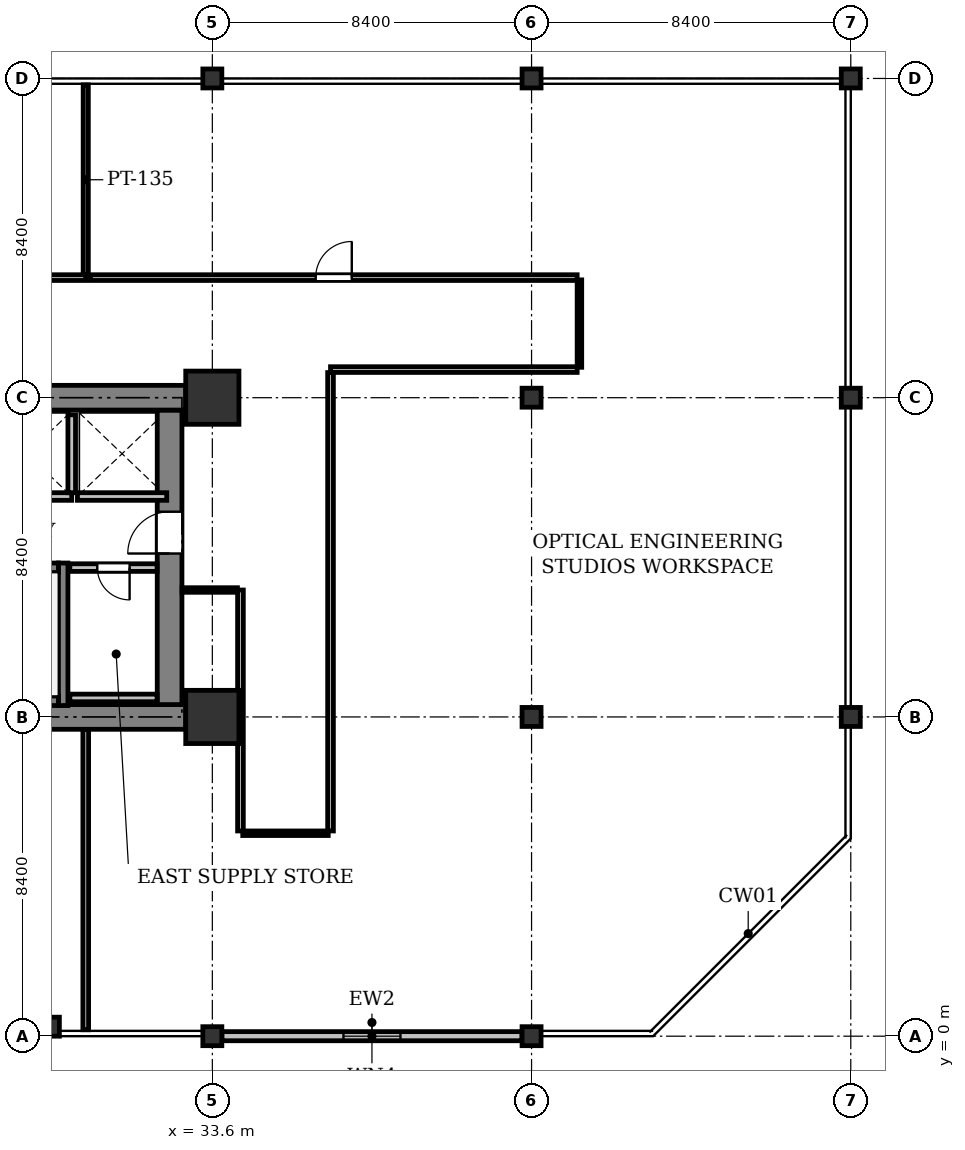
"""IFC4 building model, lengths in metres.
Left out: names, types, materials, properties, quantities, classifications, styles, units other than length and angle.
Written with IfcOpenShell. Run it as: python <this file> out.ifc"""

import sys

from ifc_helpers import new_model, si_unit, direction, frame, frame_2d, origin, origin_2d, place, context, subcontext, project, spatial, rectangle, i_section, extrude, element, fill, save


model = new_model("IFC4")
c1 = context("Model", 3, precision=1e-05, world=origin(), true_north=direction((0.0, 1.0)))
c2 = subcontext(c1, "Body", "Model", "MODEL_VIEW")
j1 = project(units=[si_unit("LENGTHUNIT", "METRE"), si_unit("PLANEANGLEUNIT", "RADIAN")], contexts=[c1])
p1 = place(None, origin())
s1 = spatial("IfcSite", under=j1, at=p1, CompositionType="ELEMENT")
p2 = place(p1, origin())
s2 = spatial("IfcBuilding", under=s1, at=p2, CompositionType="ELEMENT")
p3 = place(p2, frame((0.0, 0.0, 37.4)))
s3 = spatial("IfcBuildingStorey", under=s2, at=p3, CompositionType="ELEMENT", Elevation=37.4)
p4 = place(p3, frame((33.6, 0.0, 0.0), z_axis=(0.0, 0.0, 1.0), x_axis=(1.0, 0.0, 0.0)))
e1 = element("IfcColumn", 1, at=p4, inside=s3, PredefinedType="COLUMN", context=c2, shape_type="SweptSolid", body=[
    extrude(i_section(OverallWidth=0.5, OverallDepth=0.5, WebThickness=0.028, FlangeThickness=0.04, at=origin_2d()), origin(), (0.0, 0.0, 1.0), 4.2),
])
for number, where, z_axis, x_axis in (
    (2, (33.6, 8.4, 0.0), (0.0, 0.0, 1.0), (1.0, 0.0, 0.0)),
    (3, (33.6, 16.8, 0.0), (0.0, 0.0, 1.0), (1.0, 0.0, 0.0)),
):
    element("IfcColumn", number, at=place(p3, frame(where, z_axis=z_axis, x_axis=x_axis)), inside=s3, PredefinedType="COLUMN", context=c2, shape_type="SweptSolid", body=[
        extrude(rectangle(XDim=1.4, YDim=1.4, at=origin_2d()), origin(), (0.0, 0.0, 1.0), 4.2),
    ])
for number, where, z_axis, x_axis in (
    (4, (33.6, 25.2, 0.0), (0.0, 0.0, 1.0), (1.0, 0.0, 0.0)),
    (5, (42.0, 0.0, 0.0), (0.0, 0.0, 1.0), (1.0, 0.0, 0.0)),
    (6, (42.0, 8.4, 0.0), (0.0, 0.0, 1.0), (1.0, 0.0, 0.0)),
    (7, (42.0, 16.8, 0.0), (0.0, 0.0, 1.0), (1.0, 0.0, 0.0)),
    (8, (42.0, 25.2, 0.0), (0.0, 0.0, 1.0), (1.0, 0.0, 0.0)),
    (9, (50.4, 8.4, 0.0), (0.0, 0.0, 1.0), (1.0, 0.0, 0.0)),
    (10, (50.4, 16.8, 0.0), (0.0, 0.0, 1.0), (1.0, 0.0, 0.0)),
    (11, (50.4, 25.2, 0.0), (0.0, 0.0, 1.0), (1.0, 0.0, 0.0)),
):
    element("IfcColumn", number, at=place(p3, frame(where, z_axis=z_axis, x_axis=x_axis)), inside=s3, PredefinedType="COLUMN", context=c2, shape_type="SweptSolid", body=[
        extrude(i_section(OverallWidth=0.5, OverallDepth=0.5, WebThickness=0.028, FlangeThickness=0.04, at=origin_2d()), origin(), (0.0, 0.0, 1.0), 4.2),
    ])
p5 = place(p3, frame((29.4, 0.25, 0.0), z_axis=(0.0, 0.0, 1.0), x_axis=(1.0, 0.0, 0.0)))
e12 = element("IfcColumn", 12, at=p5, inside=s3, PredefinedType="PILASTER", context=c2, shape_type="SweptSolid", body=[
    extrude(rectangle(XDim=0.35, YDim=0.5, at=origin_2d()), origin(), (0.0, 0.0, 1.0), 4.2),
])
p6 = place(p3, frame((41.75, 0.0, 0.0), z_axis=(0.0, 0.0, 1.0), x_axis=(-1.0, 0.0, 0.0)))
e13 = element("IfcWall", 13, at=p6, inside=s3, PredefinedType="STANDARD", context=c2, shape_type="SweptSolid", body=[
    extrude(rectangle(XDim=7.9, YDim=0.24, at=frame_2d((3.95, 0.0))), origin(), (0.0, 0.0, 1.0), 3.471),
])
p7 = place(p6, frame((3.2, 0.0, 0.9)))
e14 = element("IfcOpeningElement", 14, at=p7, cuts=e13, PredefinedType="OPENING", context=c2, shape_type="SweptSolid", body=[
    extrude(rectangle(XDim=1.5, YDim=1.6, at=frame_2d((0.75, 0.8))), frame((0.0, 0.13, 0.0), z_axis=(0.0, -1.0, 0.0), x_axis=(1.0, 0.0, 0.0)), (0.0, 0.0, 1.0), 0.26),
])
p8 = place(p3, frame((25.9, 8.4, 0.0), z_axis=(0.0, 0.0, 1.0), x_axis=(1.0, 0.0, 0.0)))
e15 = element("IfcWall", 15, at=p8, inside=s3, PredefinedType="SHEAR", context=c2, shape_type="SweptSolid", body=[
    extrude(rectangle(XDim=7.0, YDim=0.65, at=frame_2d((3.5, 0.0))), origin(), (0.0, 0.0, 1.0), 3.925),
])
p9 = place(p3, frame((32.475, 8.725, 0.0), z_axis=(0.0, 0.0, 1.0), x_axis=(0.0, 1.0, 0.0)))
e16 = element("IfcWall", 16, at=p9, inside=s3, PredefinedType="SHEAR", context=c2, shape_type="SweptSolid", body=[
    extrude(rectangle(XDim=7.75, YDim=0.65, at=frame_2d((3.875, 0.0))), origin(), (0.0, 0.0, 1.0), 3.925),
])
p10 = place(p9, frame((3.975, 0.0, 0.0)))
e17 = element("IfcOpeningElement", 17, at=p10, cuts=e16, PredefinedType="OPENING", context=c2, shape_type="SweptSolid", body=[
    extrude(rectangle(XDim=1.1, YDim=2.15, at=frame_2d((0.55, 1.075))), frame((0.0, 0.335, 0.0), z_axis=(0.0, -1.0, 0.0), x_axis=(1.0, 0.0, 0.0)), (0.0, 0.0, 1.0), 0.67),
])
p11 = place(p3, frame((25.9, 16.8, 0.0), z_axis=(0.0, 0.0, 1.0), x_axis=(1.0, 0.0, 0.0)))
e18 = element("IfcWall", 18, at=p11, inside=s3, PredefinedType="SHEAR", context=c2, shape_type="SweptSolid", body=[
    extrude(rectangle(XDim=7.0, YDim=0.65, at=frame_2d((3.5, 0.0))), origin(), (0.0, 0.0, 1.0), 3.925),
])
p12 = place(p3, frame((29.675, 8.7, 0.0), z_axis=(0.0, 0.0, 1.0), x_axis=(0.0, 1.0, 0.0)))
e19 = element("IfcWall", 19, at=p12, inside=s3, PredefinedType="SHEAR", context=c2, shape_type="SweptSolid", body=[
    extrude(rectangle(XDim=3.75, YDim=0.25, at=frame_2d((1.875, 0.0))), origin(), (0.0, 0.0, 1.0), 3.925),
])
p13 = place(p3, frame((21.8, 8.825, 0.0), z_axis=(0.0, 0.0, 1.0), x_axis=(1.0, 0.0, 0.0)))
e20 = element("IfcWall", 20, at=p13, inside=s3, PredefinedType="SHEAR", context=c2, shape_type="SweptSolid", body=[
    extrude(rectangle(XDim=7.75, YDim=0.25, at=frame_2d((3.875, 0.0))), origin(), (0.0, 0.0, 1.0), 3.925),
])
p14 = place(p3, frame((21.8, 12.325, 0.0), z_axis=(0.0, 0.0, 1.0), x_axis=(1.0, 0.0, 0.0)))
e21 = element("IfcWall", 21, at=p14, inside=s3, PredefinedType="SHEAR", context=c2, shape_type="SweptSolid", body=[
    extrude(rectangle(XDim=7.75, YDim=0.25, at=frame_2d((3.875, 0.0))), origin(), (0.0, 0.0, 1.0), 3.925),
])
p15 = place(p14, frame((0.22, 0.0, 0.0)))
e22 = element("IfcOpeningElement", 22, at=p15, cuts=e21, PredefinedType="OPENING", context=c2, shape_type="SweptSolid", body=[
    extrude(rectangle(XDim=1.1, YDim=2.15, at=frame_2d((0.55, 1.075))), frame((0.0, 0.135, 0.0), z_axis=(0.0, -1.0, 0.0), x_axis=(1.0, 0.0, 0.0)), (0.0, 0.0, 1.0), 0.27),
])
p16 = place(p3, frame((27.55, 14.2, 0.0), z_axis=(0.0, 0.0, 1.0), x_axis=(1.0, 0.0, 0.0)))
e23 = element("IfcWall", 23, at=p16, inside=s3, PredefinedType="PARTITIONING", context=c2, shape_type="SweptSolid", body=[
    extrude(rectangle(XDim=2.35, YDim=0.2, at=frame_2d((1.175, 0.0))), origin(), (0.0, 0.0, 1.0), 3.925),
])
p17 = place(p3, frame((29.9, 14.3, 0.0), z_axis=(0.0, 0.0, 1.0), x_axis=(0.0, 1.0, 0.0)))
e24 = element("IfcWall", 24, at=p17, inside=s3, PredefinedType="PARTITIONING", context=c2, shape_type="SweptSolid", body=[
    extrude(rectangle(XDim=2.05, YDim=0.2, at=frame_2d((1.025, 0.0))), origin(), (0.0, 0.0, 1.0), 3.925),
])
p18 = place(p3, frame((30.05, 14.2, 0.0), z_axis=(0.0, 0.0, 1.0), x_axis=(1.0, 0.0, 0.0)))
e25 = element("IfcWall", 25, at=p18, inside=s3, PredefinedType="PARTITIONING", context=c2, shape_type="SweptSolid", body=[
    extrude(rectangle(XDim=2.35, YDim=0.2, at=frame_2d((1.175, 0.0))), origin(), (0.0, 0.0, 1.0), 3.925),
])
p19 = place(p3, frame((32.146, 12.33, 0.0), z_axis=(0.0, 0.0, 1.0), x_axis=(-1.0, 0.0, 0.0)))
e26 = element("IfcWall", 26, at=p19, inside=s3, PredefinedType="PARTITIONING", context=c2, shape_type="SweptSolid", body=[
    extrude(rectangle(XDim=2.296, YDim=0.2, at=frame_2d((1.148, 0.0))), origin(), (0.0, 0.0, 1.0), 3.925),
])
p20 = place(p19, frame((0.723, 0.0, 0.0)))
e27 = element("IfcOpeningElement", 27, at=p20, cuts=e26, PredefinedType="OPENING", context=c2, shape_type="SweptSolid", body=[
    extrude(rectangle(XDim=0.85, YDim=2.15, at=frame_2d((0.425, 1.075))), frame((0.0, 0.11, 0.0), z_axis=(0.0, -1.0, 0.0), x_axis=(1.0, 0.0, 0.0)), (0.0, 0.0, 1.0), 0.22),
])
p21 = place(p3, frame((29.85, 8.9, 0.0), z_axis=(0.0, 0.0, 1.0), x_axis=(1.0, 0.0, 0.0)))
e28 = element("IfcWall", 28, at=p21, inside=s3, PredefinedType="PARTITIONING", context=c2, shape_type="SweptSolid", body=[
    extrude(rectangle(XDim=2.296, YDim=0.2, at=frame_2d((1.148, 0.0))), origin(), (0.0, 0.0, 1.0), 3.925),
])
p22 = place(p3, frame((19.96, 19.96, 0.0), z_axis=(0.0, 0.0, 1.0), x_axis=(1.0, 0.0, 0.0)))
e29 = element("IfcWall", 29, at=p22, inside=s3, PredefinedType="PARTITIONING", context=c2, shape_type="SweptSolid", body=[
    extrude(rectangle(XDim=10.309, YDim=0.15, at=frame_2d((5.154, 0.0))), origin(), (0.0, 0.0, 1.0), 3.323),
])
p23 = place(p22, frame((4.679, 0.0, 0.0)))
e30 = element("IfcOpeningElement", 30, at=p23, cuts=e29, PredefinedType="OPENING", context=c2, shape_type="SweptSolid", body=[
    extrude(rectangle(XDim=0.95, YDim=2.15, at=frame_2d((0.475, 1.075))), frame((0.0, 0.085, 0.0), z_axis=(0.0, -1.0, 0.0), x_axis=(1.0, 0.0, 0.0)), (0.0, 0.0, 1.0), 0.17),
])
p24 = place(p3, frame((30.269, 20.039, 0.0), z_axis=(0.0, 0.0, 1.0), x_axis=(0.0, 1.0, 0.0)))
e31 = element("IfcWall", 31, at=p24, inside=s3, PredefinedType="PARTITIONING", context=c2, shape_type="SweptSolid", body=[
    extrude(rectangle(XDim=4.992, YDim=0.135, at=frame_2d((2.496, 0.0))), origin(), (0.0, 0.0, 1.0), 3.925),
])
p25 = place(p3, frame((30.269, 0.169, 0.0), z_axis=(0.0, 0.0, 1.0), x_axis=(0.0, 1.0, 0.0)))
e32 = element("IfcWall", 32, at=p25, inside=s3, PredefinedType="PARTITIONING", context=c2, shape_type="SweptSolid", body=[
    extrude(rectangle(XDim=7.902, YDim=0.15, at=frame_2d((3.951, 0.0))), origin(), (0.0, 0.0, 1.0), 3.925),
])
p26 = place(p3, frame((30.389, 19.96, 0.0), z_axis=(0.0, 0.0, 1.0), x_axis=(1.0, 0.0, 0.0)))
e33 = element("IfcWall", 33, at=p26, inside=s3, PredefinedType="PARTITIONING", context=c2, shape_type="SweptSolid", body=[
    extrude(rectangle(XDim=12.811, YDim=0.15, at=frame_2d((6.406, 0.0))), origin(), (0.0, 0.0, 1.0), 3.323),
])
p27 = place(p26, frame((5.931, 0.0, 0.0)))
e34 = element("IfcOpeningElement", 34, at=p27, cuts=e33, PredefinedType="OPENING", context=c2, shape_type="SweptSolid", body=[
    extrude(rectangle(XDim=0.95, YDim=2.15, at=frame_2d((0.475, 1.075))), frame((0.0, 0.085, 0.0), z_axis=(0.0, -1.0, 0.0), x_axis=(1.0, 0.0, 0.0)), (0.0, 0.0, 1.0), 0.17),
])
p28 = place(p3, frame((43.26, 19.9, 0.0), z_axis=(0.0, 0.0, 1.0), x_axis=(0.0, -1.0, 0.0)))
e35 = element("IfcWall", 35, at=p28, inside=s3, PredefinedType="PARTITIONING", context=c2, shape_type="SweptSolid", body=[
    extrude(rectangle(XDim=2.3, YDim=0.12, at=frame_2d((1.15, 0.0))), origin(), (0.0, 0.0, 1.0), 3.925),
])
p29 = place(p3, frame((43.2, 17.54, 0.0), z_axis=(0.0, 0.0, 1.0), x_axis=(-1.0, 0.0, 0.0)))
e36 = element("IfcWall", 36, at=p29, inside=s3, PredefinedType="PARTITIONING", context=c2, shape_type="SweptSolid", body=[
    extrude(rectangle(XDim=6.49, YDim=0.15, at=frame_2d((3.245, 0.0))), origin(), (0.0, 0.0, 1.0), 3.323),
])
p30 = place(p3, frame((36.71, 17.461, 0.0), z_axis=(0.0, 0.0, 1.0), x_axis=(0.0, -1.0, 0.0)))
e37 = element("IfcWall", 37, at=p30, inside=s3, PredefinedType="PARTITIONING", context=c2, shape_type="SweptSolid", body=[
    extrude(rectangle(XDim=12.061, YDim=0.15, at=frame_2d((6.031, 0.0))), origin(), (0.0, 0.0, 1.0), 3.313),
])
p31 = place(p3, frame((36.65, 5.34, 0.0), z_axis=(0.0, 0.0, 1.0), x_axis=(-1.0, 0.0, 0.0)))
e38 = element("IfcWall", 38, at=p31, inside=s3, PredefinedType="PARTITIONING", context=c2, shape_type="SweptSolid", body=[
    extrude(rectangle(XDim=2.25, YDim=0.12, at=frame_2d((1.125, 0.0))), origin(), (0.0, 0.0, 1.0), 3.925),
])
p32 = place(p3, frame((34.34, 5.4, 0.0), z_axis=(0.0, 0.0, 1.0), x_axis=(0.0, 1.0, 0.0)))
e39 = element("IfcWall", 39, at=p32, inside=s3, PredefinedType="PARTITIONING", context=c2, shape_type="SweptSolid", body=[
    extrude(rectangle(XDim=6.34, YDim=0.15, at=frame_2d((3.17, 0.0))), origin(), (0.0, 0.0, 1.0), 3.313),
])
p33 = place(p3, frame((34.261, 11.74, 0.0), z_axis=(0.0, 0.0, 1.0), x_axis=(-1.0, 0.0, 0.0)))
e40 = element("IfcWall", 40, at=p33, inside=s3, PredefinedType="PARTITIONING", context=c2, shape_type="SweptSolid", body=[
    extrude(rectangle(XDim=1.457, YDim=0.12, at=frame_2d((0.729, 0.0))), origin(), (0.0, 0.0, 1.0), 3.323),
])
p34 = place(p7, origin())
e41 = element("IfcWindow", 41, at=p34, inside=s3, PartitioningType="SINGLE_PANEL", PredefinedType="WINDOW", context=c2, shape_type="SweptSolid", body=[
    extrude(rectangle(XDim=1.5, YDim=1.6, at=frame_2d((0.75, 0.8))), frame((0.0, 0.03, 0.0), z_axis=(0.0, -1.0, 0.0), x_axis=(1.0, 0.0, 0.0)), (0.0, 0.0, 1.0), 0.06),
])
fill(e14, e41)
p35 = place(p10, origin())
e42 = element("IfcDoor", 42, at=p35, inside=s3, OperationType="SINGLE_SWING_LEFT", PredefinedType="DOOR", context=c2, shape_type="SweptSolid", body=[
    extrude(rectangle(XDim=1.1, YDim=2.15, at=frame_2d((0.55, 1.075))), frame((0.0, 0.025, 0.0), z_axis=(0.0, -1.0, 0.0), x_axis=(1.0, 0.0, 0.0)), (0.0, 0.0, 1.0), 0.05),
])
fill(e17, e42)
p36 = place(p20, origin())
e43 = element("IfcDoor", 43, at=p36, inside=s3, OperationType="SINGLE_SWING_LEFT", PredefinedType="DOOR", context=c2, shape_type="SweptSolid", body=[
    extrude(rectangle(XDim=0.85, YDim=2.15, at=frame_2d((0.425, 1.075))), frame((0.0, 0.025, 0.0), z_axis=(0.0, -1.0, 0.0), x_axis=(1.0, 0.0, 0.0)), (0.0, 0.0, 1.0), 0.05),
])
fill(e27, e43)
p37 = place(p27, origin())
e44 = element("IfcDoor", 44, at=p37, inside=s3, OperationType="SINGLE_SWING_RIGHT", PredefinedType="DOOR", context=c2, shape_type="SweptSolid", body=[
    extrude(rectangle(XDim=0.95, YDim=2.15, at=frame_2d((0.475, 1.075))), frame((0.0, 0.025, 0.0), z_axis=(0.0, -1.0, 0.0), x_axis=(1.0, 0.0, 0.0)), (0.0, 0.0, 1.0), 0.05),
])
fill(e34, e44)
save(model, sys.argv[1])
